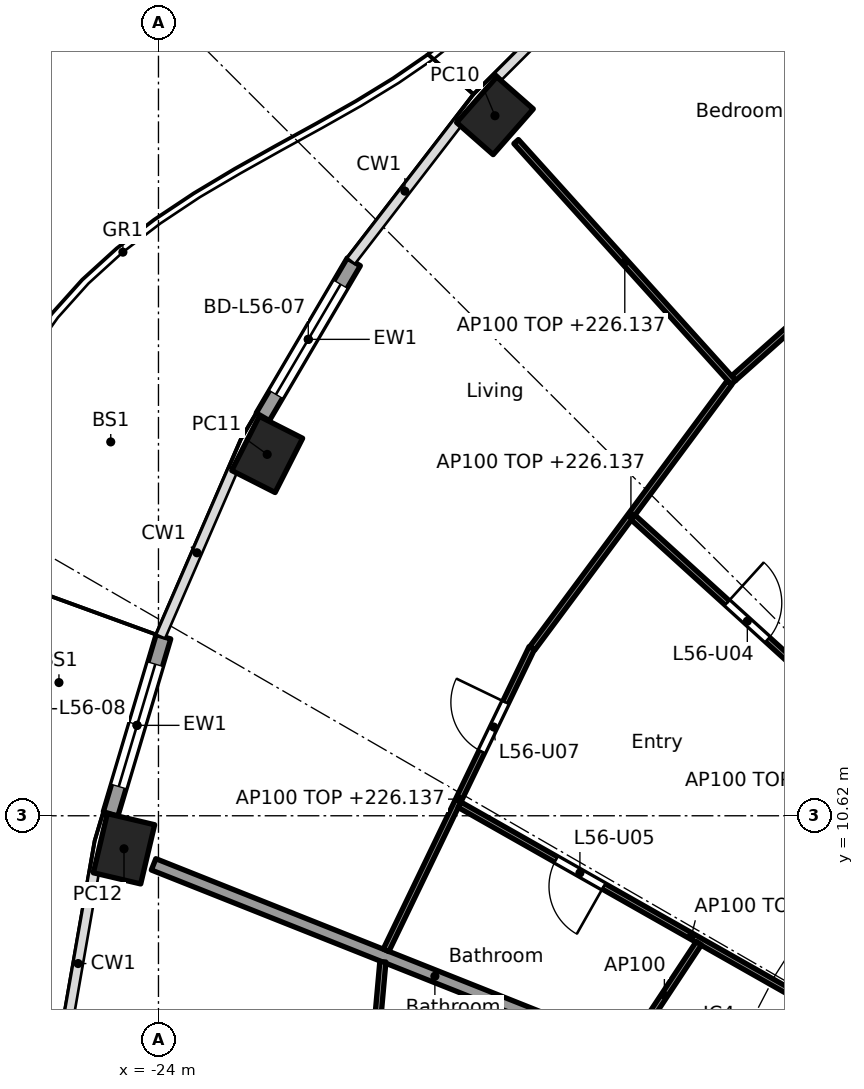
"""IFC4 building model, lengths in metres.
Left out: names, types, materials, properties, quantities, classifications, styles, units other than length and angle.
Written with IfcOpenShell. Run it as: python <this file> out.ifc"""

import sys

from ifc_helpers import new_model, si_unit, direction, frame, frame_2d, origin, origin_2d, place, context, subcontext, project, spatial, rectangle, hollow_rectangle, extrude, element, fill, save


model = new_model("IFC4")
c1 = context("Model", 3, precision=1e-05, world=origin(), true_north=direction((0.0, 1.0)))
c2 = subcontext(c1, "Body", "Model", "MODEL_VIEW")
j1 = project(units=[si_unit("LENGTHUNIT", "METRE"), si_unit("PLANEANGLEUNIT", "RADIAN")], contexts=[c1])
p1 = place(None, origin())
s1 = spatial("IfcSite", under=j1, at=p1, CompositionType="ELEMENT")
p2 = place(p1, origin())
s2 = spatial("IfcBuilding", under=s1, at=p2, CompositionType="ELEMENT")
p3 = place(p2, frame((0.0, 0.0, 223.3)))
s3 = spatial("IfcBuildingStorey", under=s2, at=p3, CompositionType="ELEMENT", Elevation=223.3)
for number, where, z_axis, x_axis in (
    (1, (-18.467, 22.132, 0.0), (0.0, 0.0, 1.0), (-0.66, -0.751, 0.0)),
    (2, (-22.212, 16.563, 0.0), (0.0, 0.0, 1.0), (-0.452, -0.892, 0.0)),
    (3, (-24.567, 10.077, 0.0), (0.0, 0.0, 1.0), (-0.229, -0.973, 0.0)),
):
    element("IfcColumn", number, at=place(p3, frame(where, z_axis=z_axis, x_axis=x_axis)), inside=s3, PredefinedType="COLUMN", context=c2, shape_type="SweptSolid", body=[
        extrude(hollow_rectangle(XDim=1.0, YDim=0.8, WallThickness=0.032, at=origin_2d()), origin(), (0.0, 0.0, 1.0), 3.7),
    ])
p4 = place(p3, frame((-22.284, 17.181, 0.0), z_axis=(0.0, 0.0, 1.0), x_axis=(0.506330171469, 0.862339699573, 0.0)))
e4 = element("IfcWall", 4, at=p4, inside=s3, PredefinedType="SOLIDWALL", context=c2, shape_type="SweptSolid", body=[
    extrude(rectangle(XDim=2.954, YDim=0.25, at=frame_2d((1.477, 0.0))), origin(), (0.0, 0.0, 1.0), 3.44),
])
p5 = place(p4, frame((0.427, 0.0, 0.0)))
e5 = element("IfcOpeningElement", 5, at=p5, cuts=e4, PredefinedType="OPENING", context=c2, shape_type="SweptSolid", body=[
    extrude(rectangle(XDim=2.1, YDim=2.4, at=frame_2d((1.05, 1.2))), frame((0.0, 0.135, 0.0), z_axis=(0.0, -1.0, 0.0), x_axis=(1.0, 0.0, 0.0)), (0.0, 0.0, 1.0), 0.27),
])
p6 = place(p3, frame((-24.787, 10.65, 0.0), z_axis=(0.0, 0.0, 1.0), x_axis=(0.285859454825, 0.95827155446, 0.0)))
e6 = element("IfcWall", 6, at=p6, inside=s3, PredefinedType="SOLIDWALL", context=c2, shape_type="SweptSolid", body=[
    extrude(rectangle(XDim=3.041, YDim=0.25, at=frame_2d((1.52, 0.0))), origin(), (0.0, 0.0, 1.0), 3.44),
])
p7 = place(p6, frame((0.47, 0.0, 0.0)))
e7 = element("IfcOpeningElement", 7, at=p7, cuts=e6, PredefinedType="OPENING", context=c2, shape_type="SweptSolid", body=[
    extrude(rectangle(XDim=2.1, YDim=2.4, at=frame_2d((1.05, 1.2))), frame((0.0, 0.135, 0.0), z_axis=(0.0, -1.0, 0.0), x_axis=(1.0, 0.0, 0.0)), (0.0, 0.0, 1.0), 0.27),
])
p8 = place(p3, frame((-14.829, 6.141, 0.0), z_axis=(0.0, 0.0, 1.0), x_axis=(-0.929202069098, 0.36957206981, 0.0)))
e8 = element("IfcWall", 8, at=p8, inside=s3, PredefinedType="PARTITIONING", context=c2, shape_type="SweptSolid", body=[
    extrude(rectangle(XDim=9.957, YDim=0.2, at=frame_2d((4.978, 0.0))), origin(), (0.0, 0.0, 1.0), 2.837),
])
p9 = place(p3, frame((-10.488, 21.422, 0.0), z_axis=(0.0, 0.0, 1.0), x_axis=(-0.747148551049, -0.664657086523, 0.0)))
e9 = element("IfcWall", 9, at=p9, inside=s3, PredefinedType="PARTITIONING", context=c2, shape_type="SweptSolid", body=[
    extrude(rectangle(XDim=5.425, YDim=0.1, at=frame_2d((2.712, 0.0))), origin(), (0.0, 0.0, 1.0), 2.837),
])
p10 = place(p9, frame((2.262, 0.0, 0.0)))
e10 = element("IfcOpeningElement", 10, at=p10, cuts=e9, PredefinedType="OPENING", context=c2, shape_type="SweptSolid", body=[
    extrude(rectangle(XDim=0.9, YDim=2.1, at=frame_2d((0.45, 1.05))), frame((0.0, 0.06, 0.0), z_axis=(0.0, -1.0, 0.0), x_axis=(1.0, 0.0, 0.0)), (0.0, 0.0, 1.0), 0.12),
])
p11 = place(p3, frame((-14.545, 17.746, 0.0), z_axis=(0.0, 0.0, 1.0), x_axis=(-0.669829144173, 0.742515264232, 0.0)))
e11 = element("IfcWall", 11, at=p11, inside=s3, PredefinedType="PARTITIONING", context=c2, shape_type="SweptSolid", body=[
    extrude(rectangle(XDim=5.334, YDim=0.1, at=frame_2d((2.667, 0.0))), origin(), (0.0, 0.0, 1.0), 2.837),
])
p12 = place(p3, frame((-14.608, 17.743, 0.0), z_axis=(0.0, 0.0, 1.0), x_axis=(-0.596174489482, -0.8028548923, 0.0)))
e12 = element("IfcWall", 12, at=p12, inside=s3, PredefinedType="PARTITIONING", context=c2, shape_type="SweptSolid", body=[
    extrude(rectangle(XDim=5.442, YDim=0.1, at=frame_2d((2.721, 0.0))), origin(), (0.0, 0.0, 1.0), 2.837),
])
p13 = place(p3, frame((-8.959, 8.952, 0.0), z_axis=(0.0, 0.0, 1.0), x_axis=(-0.740140081805, 0.672452719011, 0.0)))
e13 = element("IfcWall", 13, at=p13, inside=s3, PredefinedType="PARTITIONING", context=c2, shape_type="SweptSolid", body=[
    extrude(rectangle(XDim=9.775, YDim=0.1, at=frame_2d((4.887, 0.0))), origin(), (0.0, 0.0, 1.0), 2.762),
])
p14 = place(p13, frame((1.901, 0.0, 0.0)))
e14 = element("IfcOpeningElement", 14, at=p14, cuts=e13, PredefinedType="OPENING", context=c2, shape_type="SweptSolid", body=[
    extrude(rectangle(XDim=0.9, YDim=2.1, at=frame_2d((0.45, 1.05))), frame((0.0, 0.06, 0.0), z_axis=(0.0, -1.0, 0.0), x_axis=(1.0, 0.0, 0.0)), (0.0, 0.0, 1.0), 0.12),
])
p15 = place(p13, frame((6.789, 0.0, 0.0)))
e15 = element("IfcOpeningElement", 15, at=p15, cuts=e13, PredefinedType="OPENING", context=c2, shape_type="SweptSolid", body=[
    extrude(rectangle(XDim=0.9, YDim=2.1, at=frame_2d((0.45, 1.05))), frame((0.0, 0.06, 0.0), z_axis=(0.0, -1.0, 0.0), x_axis=(1.0, 0.0, 0.0)), (0.0, 0.0, 1.0), 0.12),
])
p16 = place(p3, frame((-17.861, 13.379, 0.0), z_axis=(0.0, 0.0, 1.0), x_axis=(-0.434302390612, -0.900767136117, 0.0)))
e16 = element("IfcWall", 16, at=p16, inside=s3, PredefinedType="PARTITIONING", context=c2, shape_type="SweptSolid", body=[
    extrude(rectangle(XDim=5.519, YDim=0.1, at=frame_2d((2.759, 0.0))), origin(), (0.0, 0.0, 1.0), 2.837),
])
p17 = place(p16, frame((0.992, 0.0, 0.0)))
e17 = element("IfcOpeningElement", 17, at=p17, cuts=e16, PredefinedType="OPENING", context=c2, shape_type="SweptSolid", body=[
    extrude(rectangle(XDim=0.9, YDim=2.1, at=frame_2d((0.45, 1.05))), frame((0.0, 0.06, 0.0), z_axis=(0.0, -1.0, 0.0), x_axis=(1.0, 0.0, 0.0)), (0.0, 0.0, 1.0), 0.12),
])
p18 = place(p3, frame((-11.425, 6.48, 0.0), z_axis=(0.0, 0.0, 1.0), x_axis=(-0.869969596547, 0.493105365094, 0.0)))
e18 = element("IfcWall", 18, at=p18, inside=s3, PredefinedType="PARTITIONING", context=c2, shape_type="SweptSolid", body=[
    extrude(rectangle(XDim=8.762, YDim=0.1, at=frame_2d((4.381, 0.0))), origin(), (0.0, 0.0, 1.0), 2.762),
])
p19 = place(p18, frame((0.35, 0.0, 0.0)))
e19 = element("IfcOpeningElement", 19, at=p19, cuts=e18, PredefinedType="OPENING", context=c2, shape_type="SweptSolid", body=[
    extrude(rectangle(XDim=0.9, YDim=2.1, at=frame_2d((0.45, 1.05))), frame((0.0, 0.06, 0.0), z_axis=(0.0, -1.0, 0.0), x_axis=(1.0, 0.0, 0.0)), (0.0, 0.0, 1.0), 0.12),
])
p20 = place(p18, frame((6.038, 0.0, 0.0)))
e20 = element("IfcOpeningElement", 20, at=p20, cuts=e18, PredefinedType="OPENING", context=c2, shape_type="SweptSolid", body=[
    extrude(rectangle(XDim=0.9, YDim=2.1, at=frame_2d((0.45, 1.05))), frame((0.0, 0.06, 0.0), z_axis=(0.0, -1.0, 0.0), x_axis=(1.0, 0.0, 0.0)), (0.0, 0.0, 1.0), 0.12),
])
p21 = place(p3, frame((-15.114, 8.524, 0.0), z_axis=(0.0, 0.0, 1.0), x_axis=(-0.551211457161, -0.834365585037, 0.0)))
e21 = element("IfcWall", 21, at=p21, inside=s3, PredefinedType="PARTITIONING", context=c2, shape_type="SweptSolid", body=[
    extrude(rectangle(XDim=2.054, YDim=0.1, at=frame_2d((1.027, 0.0))), origin(), (0.0, 0.0, 1.0), 3.44),
])
p22 = place(p3, frame((-20.31, 8.218, 0.0), z_axis=(0.0, 0.0, 1.0), x_axis=(-0.089284106956, -0.996006198899, 0.0)))
e22 = element("IfcWall", 22, at=p22, inside=s3, PredefinedType="PARTITIONING", context=c2, shape_type="SweptSolid", body=[
    extrude(rectangle(XDim=5.698, YDim=0.1, at=frame_2d((2.849, 0.0))), origin(), (0.0, 0.0, 1.0), 2.837),
])
p23 = place(p22, frame((3.761, 0.0, 0.0)))
e23 = element("IfcOpeningElement", 23, at=p23, cuts=e22, PredefinedType="OPENING", context=c2, shape_type="SweptSolid", body=[
    extrude(rectangle(XDim=0.9, YDim=2.1, at=frame_2d((0.45, 1.05))), frame((0.0, 0.06, 0.0), z_axis=(0.0, -1.0, 0.0), x_axis=(1.0, 0.0, 0.0)), (0.0, 0.0, 1.0), 0.12),
])
p24 = place(p5, origin())
e24 = element("IfcDoor", 24, at=p24, inside=s3, OperationType="SLIDING_TO_LEFT", PredefinedType="DOOR", context=c2, shape_type="SweptSolid", body=[
    extrude(rectangle(XDim=2.1, YDim=2.4, at=frame_2d((1.05, 1.2))), frame((0.0, 0.025, 0.0), z_axis=(0.0, -1.0, 0.0), x_axis=(1.0, 0.0, 0.0)), (0.0, 0.0, 1.0), 0.05),
])
fill(e5, e24)
p25 = place(p7, origin())
e25 = element("IfcDoor", 25, at=p25, inside=s3, OperationType="SLIDING_TO_LEFT", PredefinedType="DOOR", context=c2, shape_type="SweptSolid", body=[
    extrude(rectangle(XDim=2.1, YDim=2.4, at=frame_2d((1.05, 1.2))), frame((0.0, 0.025, 0.0), z_axis=(0.0, -1.0, 0.0), x_axis=(1.0, 0.0, 0.0)), (0.0, 0.0, 1.0), 0.05),
])
fill(e7, e25)
p26 = place(p15, frame((0.9, 0.0, 0.0), x_axis=(-1.0, 0.0, 0.0)))
e26 = element("IfcDoor", 26, at=p26, inside=s3, OperationType="SINGLE_SWING_LEFT", PredefinedType="DOOR", context=c2, shape_type="SweptSolid", body=[
    extrude(rectangle(XDim=0.9, YDim=2.1, at=frame_2d((0.45, 1.05))), frame((0.0, 0.025, 0.0), z_axis=(0.0, -1.0, 0.0), x_axis=(1.0, 0.0, 0.0)), (0.0, 0.0, 1.0), 0.05),
])
fill(e15, e26)
p27 = place(p20, origin())
e27 = element("IfcDoor", 27, at=p27, inside=s3, OperationType="SINGLE_SWING_LEFT", PredefinedType="DOOR", context=c2, shape_type="SweptSolid", body=[
    extrude(rectangle(XDim=0.9, YDim=2.1, at=frame_2d((0.45, 1.05))), frame((0.0, 0.025, 0.0), z_axis=(0.0, -1.0, 0.0), x_axis=(1.0, 0.0, 0.0)), (0.0, 0.0, 1.0), 0.05),
])
fill(e20, e27)
p28 = place(p17, frame((0.9, 0.0, 0.0), x_axis=(-1.0, 0.0, 0.0)))
e28 = element("IfcDoor", 28, at=p28, inside=s3, OperationType="SINGLE_SWING_RIGHT", PredefinedType="DOOR", context=c2, shape_type="SweptSolid", body=[
    extrude(rectangle(XDim=0.9, YDim=2.1, at=frame_2d((0.45, 1.05))), frame((0.0, 0.025, 0.0), z_axis=(0.0, -1.0, 0.0), x_axis=(1.0, 0.0, 0.0)), (0.0, 0.0, 1.0), 0.05),
])
fill(e17, e28)
save(model, sys.argv[1])
